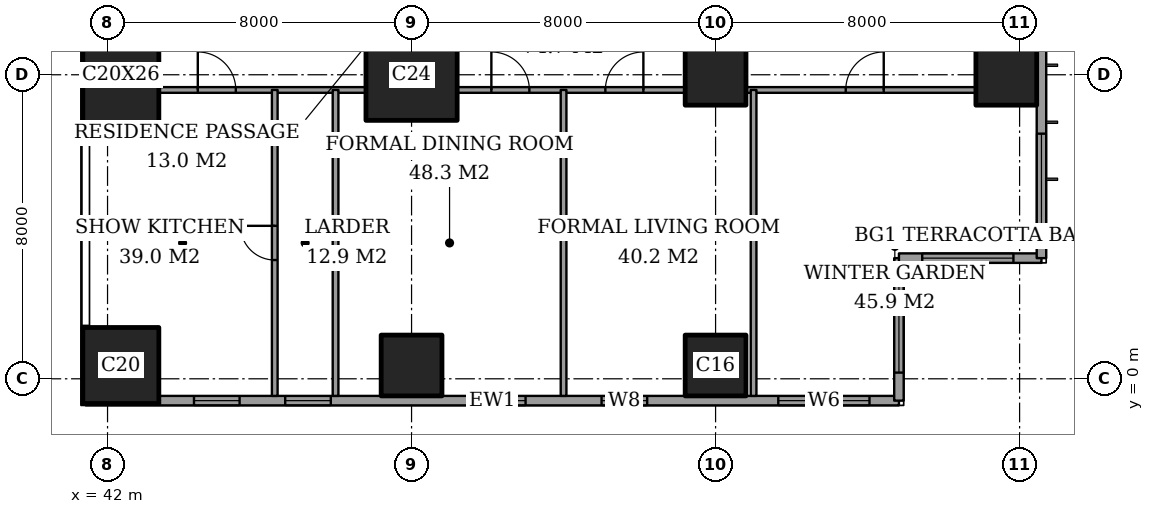
"""IFC4 building model, lengths in metres.
Left out: names, types, materials, properties, quantities, classifications, styles, units other than length and angle.
Written with IfcOpenShell. Run it as: python <this file> out.ifc"""

import sys

from ifc_helpers import new_model, si_unit, direction, frame, frame_2d, origin, origin_2d, place, context, subcontext, project, spatial, rectangle, extrude, element, fill, save


model = new_model("IFC4")
c1 = context("Model", 3, precision=1e-05, world=origin(), true_north=direction((0.0, 1.0)))
c2 = subcontext(c1, "Body", "Model", "MODEL_VIEW")
j1 = project(units=[si_unit("LENGTHUNIT", "METRE"), si_unit("PLANEANGLEUNIT", "RADIAN")], contexts=[c1])
p1 = place(None, origin())
s1 = spatial("IfcSite", under=j1, at=p1, CompositionType="ELEMENT")
p2 = place(p1, origin())
s2 = spatial("IfcBuilding", under=s1, at=p2, CompositionType="ELEMENT")
p3 = place(p2, frame((0.0, 0.0, 266.4)))
s3 = spatial("IfcBuildingStorey", under=s2, at=p3, CompositionType="ELEMENT", Elevation=266.4)
p4 = place(p3, frame((42.35, 0.35, 0.0), z_axis=(0.0, 0.0, 1.0), x_axis=(1.0, 0.0, 0.0)))
e1 = element("IfcColumn", 1, at=p4, inside=s3, PredefinedType="COLUMN", context=c2, shape_type="SweptSolid", body=[
    extrude(rectangle(XDim=2.0, YDim=2.0, at=origin_2d()), origin(), (0.0, 0.0, 1.0), 3.6),
])
p5 = place(p3, frame((42.35, 8.0, 0.0), z_axis=(0.0, 0.0, 1.0), x_axis=(1.0, 0.0, 0.0)))
e2 = element("IfcColumn", 2, at=p5, inside=s3, PredefinedType="COLUMN", context=c2, shape_type="SweptSolid", body=[
    extrude(rectangle(XDim=2.0, YDim=2.6, at=origin_2d()), origin(), (0.0, 0.0, 1.0), 3.6),
])
p6 = place(p3, frame((50.0, 0.35, 0.0), z_axis=(0.0, 0.0, 1.0), x_axis=(1.0, 0.0, 0.0)))
e3 = element("IfcColumn", 3, at=p6, inside=s3, PredefinedType="COLUMN", context=c2, shape_type="SweptSolid", body=[
    extrude(rectangle(XDim=1.6, YDim=1.6, at=origin_2d()), origin(), (0.0, 0.0, 1.0), 3.6),
])
p7 = place(p3, frame((50.0, 8.0, 0.0), z_axis=(0.0, 0.0, 1.0), x_axis=(1.0, 0.0, 0.0)))
e4 = element("IfcColumn", 4, at=p7, inside=s3, PredefinedType="COLUMN", context=c2, shape_type="SweptSolid", body=[
    extrude(rectangle(XDim=2.4, YDim=2.4, at=origin_2d()), origin(), (0.0, 0.0, 1.0), 3.6),
])
for number, where, z_axis, x_axis in (
    (5, (58.0, 0.35, 0.0), (0.0, 0.0, 1.0), (1.0, 0.0, 0.0)),
    (6, (58.0, 8.0, 0.0), (0.0, 0.0, 1.0), (1.0, 0.0, 0.0)),
    (7, (65.65, 8.0, 0.0), (0.0, 0.0, 1.0), (1.0, 0.0, 0.0)),
):
    element("IfcColumn", number, at=place(p3, frame(where, z_axis=z_axis, x_axis=x_axis)), inside=s3, PredefinedType="COLUMN", context=c2, shape_type="SweptSolid", body=[
        extrude(rectangle(XDim=1.6, YDim=1.6, at=origin_2d()), origin(), (0.0, 0.0, 1.0), 3.6),
    ])
p8 = place(p3, frame((41.425, -0.575, 0.0), z_axis=(0.0, 0.0, 1.0), x_axis=(1.0, 0.0, 0.0)))
e8 = element("IfcWall", 8, at=p8, inside=s3, PredefinedType="SOLIDWALL", context=c2, shape_type="SweptSolid", body=[
    extrude(rectangle(XDim=21.4, YDim=0.25, at=frame_2d((10.7, 0.0))), origin(), (0.0, 0.0, 1.0), 3.6),
])
p9 = place(p8, frame((2.85, 0.0, 0.6)))
e9 = element("IfcOpeningElement", 9, at=p9, cuts=e8, PredefinedType="OPENING", context=c2, shape_type="SweptSolid", body=[
    extrude(rectangle(XDim=1.2, YDim=2.0, at=frame_2d((0.6, 1.0))), frame((0.0, 0.135, 0.0), z_axis=(0.0, -1.0, 0.0), x_axis=(1.0, 0.0, 0.0)), (0.0, 0.0, 1.0), 0.27),
])
p10 = place(p8, frame((5.25, 0.0, 0.6)))
e10 = element("IfcOpeningElement", 10, at=p10, cuts=e8, PredefinedType="OPENING", context=c2, shape_type="SweptSolid", body=[
    extrude(rectangle(XDim=1.2, YDim=2.0, at=frame_2d((0.6, 1.0))), frame((0.0, 0.135, 0.0), z_axis=(0.0, -1.0, 0.0), x_axis=(1.0, 0.0, 0.0)), (0.0, 0.0, 1.0), 0.27),
])
p11 = place(p8, frame((10.375, 0.0, 0.6)))
e11 = element("IfcOpeningElement", 11, at=p11, cuts=e8, PredefinedType="OPENING", context=c2, shape_type="SweptSolid", body=[
    extrude(rectangle(XDim=1.2, YDim=2.0, at=frame_2d((0.6, 1.0))), frame((0.0, 0.135, 0.0), z_axis=(0.0, -1.0, 0.0), x_axis=(1.0, 0.0, 0.0)), (0.0, 0.0, 1.0), 0.27),
])
p12 = place(p8, frame((13.575, 0.0, 0.6)))
e12 = element("IfcOpeningElement", 12, at=p12, cuts=e8, PredefinedType="OPENING", context=c2, shape_type="SweptSolid", body=[
    extrude(rectangle(XDim=1.2, YDim=2.0, at=frame_2d((0.6, 1.0))), frame((0.0, 0.135, 0.0), z_axis=(0.0, -1.0, 0.0), x_axis=(1.0, 0.0, 0.0)), (0.0, 0.0, 1.0), 0.27),
])
p13 = place(p8, frame((18.225, 0.0, 0.6)))
e13 = element("IfcOpeningElement", 13, at=p13, cuts=e8, PredefinedType="OPENING", context=c2, shape_type="SweptSolid", body=[
    extrude(rectangle(XDim=2.4, YDim=2.0, at=frame_2d((1.2, 1.0))), frame((0.0, 0.135, 0.0), z_axis=(0.0, -1.0, 0.0), x_axis=(1.0, 0.0, 0.0)), (0.0, 0.0, 1.0), 0.27),
])
p14 = place(p3, frame((62.825, -0.575, 0.0), z_axis=(0.0, 0.0, 1.0), x_axis=(0.0, 1.0, 0.0)))
e14 = element("IfcWall", 14, at=p14, inside=s3, PredefinedType="SOLIDWALL", context=c2, shape_type="SweptSolid", body=[
    extrude(rectangle(XDim=3.75, YDim=0.25, at=frame_2d((1.875, 0.0))), origin(), (0.0, 0.0, 1.0), 3.6),
])
p15 = place(p14, frame((0.738, 0.0, 0.6)))
e15 = element("IfcOpeningElement", 15, at=p15, cuts=e14, PredefinedType="OPENING", context=c2, shape_type="SweptSolid", body=[
    extrude(rectangle(XDim=2.4, YDim=2.0, at=frame_2d((1.2, 1.0))), frame((0.0, 0.135, 0.0), z_axis=(0.0, -1.0, 0.0), x_axis=(1.0, 0.0, 0.0)), (0.0, 0.0, 1.0), 0.27),
])
p16 = place(p3, frame((62.825, 3.175, 0.0), z_axis=(0.0, 0.0, 1.0), x_axis=(1.0, 0.0, 0.0)))
e16 = element("IfcWall", 16, at=p16, inside=s3, PredefinedType="SOLIDWALL", context=c2, shape_type="SweptSolid", body=[
    extrude(rectangle(XDim=3.75, YDim=0.25, at=frame_2d((1.875, 0.0))), origin(), (0.0, 0.0, 1.0), 3.6),
])
p17 = place(p16, frame((0.613, 0.0, 0.6)))
e17 = element("IfcOpeningElement", 17, at=p17, cuts=e16, PredefinedType="OPENING", context=c2, shape_type="SweptSolid", body=[
    extrude(rectangle(XDim=2.4, YDim=2.0, at=frame_2d((1.2, 1.0))), frame((0.0, 0.135, 0.0), z_axis=(0.0, -1.0, 0.0), x_axis=(1.0, 0.0, 0.0)), (0.0, 0.0, 1.0), 0.27),
])
p18 = place(p3, frame((66.575, 3.175, 0.0), z_axis=(0.0, 0.0, 1.0), x_axis=(0.0, 1.0, 0.0)))
e18 = element("IfcWall", 18, at=p18, inside=s3, PredefinedType="SOLIDWALL", context=c2, shape_type="SweptSolid", body=[
    extrude(rectangle(XDim=41.65, YDim=0.25, at=frame_2d((20.825, 0.0))), origin(), (0.0, 0.0, 1.0), 3.6),
])
p19 = place(p18, frame((0.875, 0.0, 0.6)))
e19 = element("IfcOpeningElement", 19, at=p19, cuts=e18, PredefinedType="OPENING", context=c2, shape_type="SweptSolid", body=[
    extrude(rectangle(XDim=2.4, YDim=2.0, at=frame_2d((1.2, 1.0))), frame((0.0, 0.135, 0.0), z_axis=(0.0, -1.0, 0.0), x_axis=(1.0, 0.0, 0.0)), (0.0, 0.0, 1.0), 0.27),
])
p20 = place(p18, frame((6.0, 0.0, 0.6)))
e20 = element("IfcOpeningElement", 20, at=p20, cuts=e18, PredefinedType="OPENING", context=c2, shape_type="SweptSolid", body=[
    extrude(rectangle(XDim=1.2, YDim=2.0, at=frame_2d((0.6, 1.0))), frame((0.0, 0.135, 0.0), z_axis=(0.0, -1.0, 0.0), x_axis=(1.0, 0.0, 0.0)), (0.0, 0.0, 1.0), 0.27),
])
p21 = place(p18, frame((8.525, 0.0, 0.6)))
e21 = element("IfcOpeningElement", 21, at=p21, cuts=e18, PredefinedType="OPENING", context=c2, shape_type="SweptSolid", body=[
    extrude(rectangle(XDim=2.4, YDim=2.0, at=frame_2d((1.2, 1.0))), frame((0.0, 0.135, 0.0), z_axis=(0.0, -1.0, 0.0), x_axis=(1.0, 0.0, 0.0)), (0.0, 0.0, 1.0), 0.27),
])
p22 = place(p18, frame((15.625, 0.0, 0.6)))
e22 = element("IfcOpeningElement", 22, at=p22, cuts=e18, PredefinedType="OPENING", context=c2, shape_type="SweptSolid", body=[
    extrude(rectangle(XDim=2.4, YDim=2.0, at=frame_2d((1.2, 1.0))), frame((0.0, 0.135, 0.0), z_axis=(0.0, -1.0, 0.0), x_axis=(1.0, 0.0, 0.0)), (0.0, 0.0, 1.0), 0.27),
])
p23 = place(p18, frame((23.525, 0.0, 0.6)))
e23 = element("IfcOpeningElement", 23, at=p23, cuts=e18, PredefinedType="OPENING", context=c2, shape_type="SweptSolid", body=[
    extrude(rectangle(XDim=2.4, YDim=2.0, at=frame_2d((1.2, 1.0))), frame((0.0, 0.135, 0.0), z_axis=(0.0, -1.0, 0.0), x_axis=(1.0, 0.0, 0.0)), (0.0, 0.0, 1.0), 0.27),
])
p24 = place(p18, frame((30.625, 0.0, 0.6)))
e24 = element("IfcOpeningElement", 24, at=p24, cuts=e18, PredefinedType="OPENING", context=c2, shape_type="SweptSolid", body=[
    extrude(rectangle(XDim=2.4, YDim=2.0, at=frame_2d((1.2, 1.0))), frame((0.0, 0.135, 0.0), z_axis=(0.0, -1.0, 0.0), x_axis=(1.0, 0.0, 0.0)), (0.0, 0.0, 1.0), 0.27),
])
p25 = place(p18, frame((34.325, 0.0, 0.6)))
e25 = element("IfcOpeningElement", 25, at=p25, cuts=e18, PredefinedType="OPENING", context=c2, shape_type="SweptSolid", body=[
    extrude(rectangle(XDim=1.2, YDim=2.0, at=frame_2d((0.6, 1.0))), frame((0.0, 0.135, 0.0), z_axis=(0.0, -1.0, 0.0), x_axis=(1.0, 0.0, 0.0)), (0.0, 0.0, 1.0), 0.27),
])
p26 = place(p18, frame((38.375, 0.0, 0.6)))
e26 = element("IfcOpeningElement", 26, at=p26, cuts=e18, PredefinedType="OPENING", context=c2, shape_type="SweptSolid", body=[
    extrude(rectangle(XDim=2.4, YDim=2.0, at=frame_2d((1.2, 1.0))), frame((0.0, 0.135, 0.0), z_axis=(0.0, -1.0, 0.0), x_axis=(1.0, 0.0, 0.0)), (0.0, 0.0, 1.0), 0.27),
])
p27 = place(p3, frame((43.35, 7.6, 0.0), z_axis=(0.0, 0.0, 1.0), x_axis=(1.0, 0.0, 0.0)))
e27 = element("IfcWall", 27, at=p27, inside=s3, PredefinedType="PARTITIONING", context=c2, shape_type="SweptSolid", body=[
    extrude(rectangle(XDim=5.45, YDim=0.15, at=frame_2d((2.725, 0.0))), origin(), (0.0, 0.0, 1.0), 3.35),
])
p28 = place(p27, frame((1.025, 0.0, 0.0)))
e28 = element("IfcOpeningElement", 28, at=p28, cuts=e27, PredefinedType="OPENING", context=c2, shape_type="SweptSolid", body=[
    extrude(rectangle(XDim=1.0, YDim=2.1, at=frame_2d((0.5, 1.05))), frame((0.0, 0.085, 0.0), z_axis=(0.0, -1.0, 0.0), x_axis=(1.0, 0.0, 0.0)), (0.0, 0.0, 1.0), 0.17),
])
p29 = place(p3, frame((51.2, 7.6, 0.0), z_axis=(0.0, 0.0, 1.0), x_axis=(1.0, 0.0, 0.0)))
e29 = element("IfcWall", 29, at=p29, inside=s3, PredefinedType="PARTITIONING", context=c2, shape_type="SweptSolid", body=[
    extrude(rectangle(XDim=6.0, YDim=0.15, at=frame_2d((3.0, 0.0))), origin(), (0.0, 0.0, 1.0), 3.35),
])
p30 = place(p29, frame((3.9, 0.0, 0.0)))
e30 = element("IfcOpeningElement", 30, at=p30, cuts=e29, PredefinedType="OPENING", context=c2, shape_type="SweptSolid", body=[
    extrude(rectangle(XDim=1.0, YDim=2.1, at=frame_2d((0.5, 1.05))), frame((0.0, 0.085, 0.0), z_axis=(0.0, -1.0, 0.0), x_axis=(1.0, 0.0, 0.0)), (0.0, 0.0, 1.0), 0.17),
])
p31 = place(p29, frame((0.9, 0.0, 0.0)))
e31 = element("IfcOpeningElement", 31, at=p31, cuts=e29, PredefinedType="OPENING", context=c2, shape_type="SweptSolid", body=[
    extrude(rectangle(XDim=1.0, YDim=2.1, at=frame_2d((0.5, 1.05))), frame((0.0, 0.085, 0.0), z_axis=(0.0, -1.0, 0.0), x_axis=(1.0, 0.0, 0.0)), (0.0, 0.0, 1.0), 0.17),
])
p32 = place(p3, frame((58.8, 7.6, 0.0), z_axis=(0.0, 0.0, 1.0), x_axis=(1.0, 0.0, 0.0)))
e32 = element("IfcWall", 32, at=p32, inside=s3, PredefinedType="PARTITIONING", context=c2, shape_type="SweptSolid", body=[
    extrude(rectangle(XDim=6.05, YDim=0.15, at=frame_2d((3.025, 0.0))), origin(), (0.0, 0.0, 1.0), 3.35),
])
p33 = place(p32, frame((2.625, 0.0, 0.0)))
e33 = element("IfcOpeningElement", 33, at=p33, cuts=e32, PredefinedType="OPENING", context=c2, shape_type="SweptSolid", body=[
    extrude(rectangle(XDim=1.0, YDim=2.1, at=frame_2d((0.5, 1.05))), frame((0.0, 0.085, 0.0), z_axis=(0.0, -1.0, 0.0), x_axis=(1.0, 0.0, 0.0)), (0.0, 0.0, 1.0), 0.17),
])
p34 = place(p3, frame((46.4, -0.45, 0.0), z_axis=(0.0, 0.0, 1.0), x_axis=(0.0, 1.0, 0.0)))
e34 = element("IfcWall", 34, at=p34, inside=s3, PredefinedType="PARTITIONING", context=c2, shape_type="SweptSolid", body=[
    extrude(rectangle(XDim=8.05, YDim=0.15, at=frame_2d((4.025, 0.0))), origin(), (0.0, 0.0, 1.0), 3.35),
])
p35 = place(p34, frame((3.575, 0.0, 0.0)))
e35 = element("IfcOpeningElement", 35, at=p35, cuts=e34, PredefinedType="OPENING", context=c2, shape_type="SweptSolid", body=[
    extrude(rectangle(XDim=0.9, YDim=2.1, at=frame_2d((0.45, 1.05))), frame((0.0, 0.085, 0.0), z_axis=(0.0, -1.0, 0.0), x_axis=(1.0, 0.0, 0.0)), (0.0, 0.0, 1.0), 0.17),
])
for number, where, z_axis, x_axis in (
    (36, (48.0, -0.45, 0.0), (0.0, 0.0, 1.0), (0.0, 1.0, 0.0)),
    (37, (54.0, -0.45, 0.0), (0.0, 0.0, 1.0), (0.0, 1.0, 0.0)),
    (38, (59.0, -0.45, 0.0), (0.0, 0.0, 1.0), (0.0, 1.0, 0.0)),
):
    element("IfcWall", number, at=place(p3, frame(where, z_axis=z_axis, x_axis=x_axis)), inside=s3, PredefinedType="PARTITIONING", context=c2, shape_type="SweptSolid", body=[
        extrude(rectangle(XDim=8.05, YDim=0.15, at=frame_2d((4.025, 0.0))), origin(), (0.0, 0.0, 1.0), 3.35),
    ])
p36 = place(p9, origin())
e39 = element("IfcWindow", 39, at=p36, inside=s3, PartitioningType="SINGLE_PANEL", PredefinedType="WINDOW", context=c2, shape_type="SweptSolid", body=[
    extrude(rectangle(XDim=1.2, YDim=2.0, at=frame_2d((0.6, 1.0))), frame((0.0, 0.03, 0.0), z_axis=(0.0, -1.0, 0.0), x_axis=(1.0, 0.0, 0.0)), (0.0, 0.0, 1.0), 0.06),
])
fill(e9, e39)
p37 = place(p10, origin())
e40 = element("IfcWindow", 40, at=p37, inside=s3, PartitioningType="SINGLE_PANEL", PredefinedType="WINDOW", context=c2, shape_type="SweptSolid", body=[
    extrude(rectangle(XDim=1.2, YDim=2.0, at=frame_2d((0.6, 1.0))), frame((0.0, 0.03, 0.0), z_axis=(0.0, -1.0, 0.0), x_axis=(1.0, 0.0, 0.0)), (0.0, 0.0, 1.0), 0.06),
])
fill(e10, e40)
p38 = place(p11, origin())
e41 = element("IfcWindow", 41, at=p38, inside=s3, PartitioningType="SINGLE_PANEL", PredefinedType="WINDOW", context=c2, shape_type="SweptSolid", body=[
    extrude(rectangle(XDim=1.2, YDim=2.0, at=frame_2d((0.6, 1.0))), frame((0.0, 0.03, 0.0), z_axis=(0.0, -1.0, 0.0), x_axis=(1.0, 0.0, 0.0)), (0.0, 0.0, 1.0), 0.06),
])
fill(e11, e41)
p39 = place(p12, origin())
e42 = element("IfcWindow", 42, at=p39, inside=s3, PartitioningType="SINGLE_PANEL", PredefinedType="WINDOW", context=c2, shape_type="SweptSolid", body=[
    extrude(rectangle(XDim=1.2, YDim=2.0, at=frame_2d((0.6, 1.0))), frame((0.0, 0.03, 0.0), z_axis=(0.0, -1.0, 0.0), x_axis=(1.0, 0.0, 0.0)), (0.0, 0.0, 1.0), 0.06),
])
fill(e12, e42)
p40 = place(p13, origin())
e43 = element("IfcWindow", 43, at=p40, inside=s3, PartitioningType="SINGLE_PANEL", PredefinedType="WINDOW", context=c2, shape_type="SweptSolid", body=[
    extrude(rectangle(XDim=2.4, YDim=2.0, at=frame_2d((1.2, 1.0))), frame((0.0, 0.03, 0.0), z_axis=(0.0, -1.0, 0.0), x_axis=(1.0, 0.0, 0.0)), (0.0, 0.0, 1.0), 0.06),
])
fill(e13, e43)
p41 = place(p15, origin())
e44 = element("IfcWindow", 44, at=p41, inside=s3, PartitioningType="SINGLE_PANEL", PredefinedType="WINDOW", context=c2, shape_type="SweptSolid", body=[
    extrude(rectangle(XDim=2.4, YDim=2.0, at=frame_2d((1.2, 1.0))), frame((0.0, 0.03, 0.0), z_axis=(0.0, -1.0, 0.0), x_axis=(1.0, 0.0, 0.0)), (0.0, 0.0, 1.0), 0.06),
])
fill(e15, e44)
p42 = place(p17, origin())
e45 = element("IfcWindow", 45, at=p42, inside=s3, PartitioningType="SINGLE_PANEL", PredefinedType="WINDOW", context=c2, shape_type="SweptSolid", body=[
    extrude(rectangle(XDim=2.4, YDim=2.0, at=frame_2d((1.2, 1.0))), frame((0.0, 0.03, 0.0), z_axis=(0.0, -1.0, 0.0), x_axis=(1.0, 0.0, 0.0)), (0.0, 0.0, 1.0), 0.06),
])
fill(e17, e45)
p43 = place(p19, origin())
e46 = element("IfcWindow", 46, at=p43, inside=s3, PartitioningType="SINGLE_PANEL", PredefinedType="WINDOW", context=c2, shape_type="SweptSolid", body=[
    extrude(rectangle(XDim=2.4, YDim=2.0, at=frame_2d((1.2, 1.0))), frame((0.0, 0.03, 0.0), z_axis=(0.0, -1.0, 0.0), x_axis=(1.0, 0.0, 0.0)), (0.0, 0.0, 1.0), 0.06),
])
fill(e19, e46)
p44 = place(p33, origin())
e47 = element("IfcDoor", 47, at=p44, inside=s3, OperationType="SINGLE_SWING_LEFT", PredefinedType="DOOR", context=c2, shape_type="SweptSolid", body=[
    extrude(rectangle(XDim=1.0, YDim=2.1, at=frame_2d((0.5, 1.05))), frame((0.0, 0.025, 0.0), z_axis=(0.0, -1.0, 0.0), x_axis=(1.0, 0.0, 0.0)), (0.0, 0.0, 1.0), 0.05),
])
fill(e33, e47)
p45 = place(p30, origin())
e48 = element("IfcDoor", 48, at=p45, inside=s3, OperationType="SINGLE_SWING_LEFT", PredefinedType="DOOR", context=c2, shape_type="SweptSolid", body=[
    extrude(rectangle(XDim=1.0, YDim=2.1, at=frame_2d((0.5, 1.05))), frame((0.0, 0.025, 0.0), z_axis=(0.0, -1.0, 0.0), x_axis=(1.0, 0.0, 0.0)), (0.0, 0.0, 1.0), 0.05),
])
fill(e30, e48)
p46 = place(p31, origin())
e49 = element("IfcDoor", 49, at=p46, inside=s3, OperationType="SINGLE_SWING_RIGHT", PredefinedType="DOOR", context=c2, shape_type="SweptSolid", body=[
    extrude(rectangle(XDim=1.0, YDim=2.1, at=frame_2d((0.5, 1.05))), frame((0.0, 0.025, 0.0), z_axis=(0.0, -1.0, 0.0), x_axis=(1.0, 0.0, 0.0)), (0.0, 0.0, 1.0), 0.05),
])
fill(e31, e49)
p47 = place(p35, origin())
e50 = element("IfcDoor", 50, at=p47, inside=s3, OperationType="SINGLE_SWING_LEFT", PredefinedType="DOOR", context=c2, shape_type="SweptSolid", body=[
    extrude(rectangle(XDim=0.9, YDim=2.1, at=frame_2d((0.45, 1.05))), frame((0.0, 0.025, 0.0), z_axis=(0.0, -1.0, 0.0), x_axis=(1.0, 0.0, 0.0)), (0.0, 0.0, 1.0), 0.05),
])
fill(e35, e50)
p48 = place(p28, origin())
e51 = element("IfcDoor", 51, at=p48, inside=s3, OperationType="SINGLE_SWING_RIGHT", PredefinedType="DOOR", context=c2, shape_type="SweptSolid", body=[
    extrude(rectangle(XDim=1.0, YDim=2.1, at=frame_2d((0.5, 1.05))), frame((0.0, 0.025, 0.0), z_axis=(0.0, -1.0, 0.0), x_axis=(1.0, 0.0, 0.0)), (0.0, 0.0, 1.0), 0.05),
])
fill(e28, e51)
save(model, sys.argv[1])
